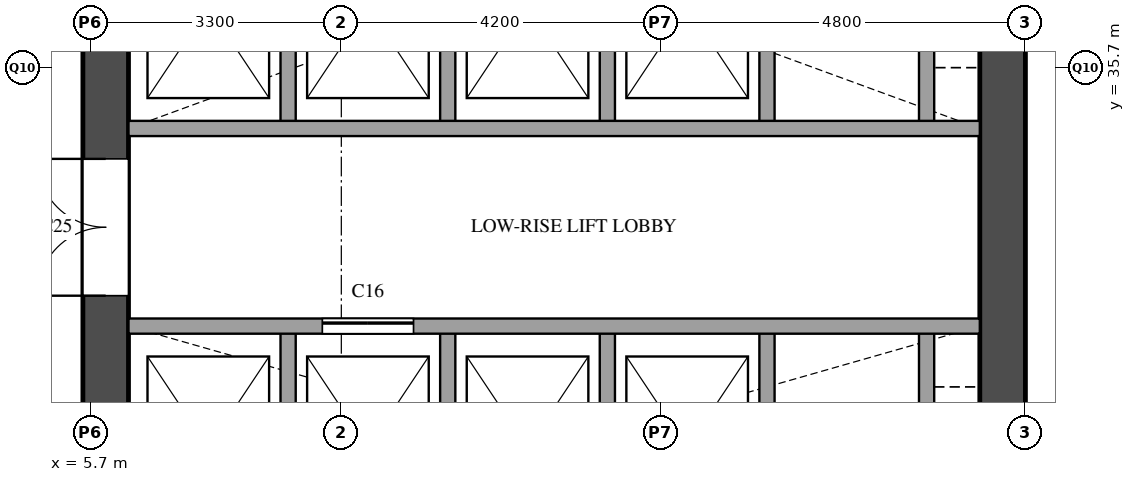
"""IFC4 building model, lengths in metres.
Left out: names, types, materials, properties, quantities, classifications, styles, units other than length and angle.
Written with IfcOpenShell. Run it as: python <this file> out.ifc"""

import sys

from ifc_helpers import new_model, si_unit, direction, frame, frame_2d, origin, place, context, subcontext, project, spatial, rectangle, extrude, element, fill, save


model = new_model("IFC4")
c1 = context("Model", 3, precision=1e-05, world=origin(), true_north=direction((0.0, 1.0)))
c2 = subcontext(c1, "Body", "Model", "MODEL_VIEW")
j1 = project(units=[si_unit("LENGTHUNIT", "METRE"), si_unit("PLANEANGLEUNIT", "RADIAN")], contexts=[c1])
p1 = place(None, origin())
s1 = spatial("IfcSite", under=j1, at=p1, CompositionType="ELEMENT")
p2 = place(p1, origin())
s2 = spatial("IfcBuilding", under=s1, at=p2, CompositionType="ELEMENT")
p3 = place(p2, frame((0.0, 0.0, 85.4)))
s3 = spatial("IfcBuildingStorey", under=s2, at=p3, CompositionType="ELEMENT", Elevation=85.4)
p4 = place(p3, frame((5.9, 29.1, 0.0), z_axis=(0.0, 0.0, 1.0), x_axis=(0.0, 1.0, 0.0)))
e1 = element("IfcWall", 1, at=p4, inside=s3, PredefinedType="SHEAR", context=c2, shape_type="SweptSolid", body=[
    extrude(rectangle(XDim=20.3, YDim=0.6, at=frame_2d((10.15, 0.0))), origin(), (0.0, 0.0, 1.0), 3.5),
])
p5 = place(p4, frame((3.6, 0.0, 0.0)))
e2 = element("IfcOpeningElement", 2, at=p5, cuts=e1, PredefinedType="OPENING", context=c2, shape_type="SweptSolid", body=[
    extrude(rectangle(XDim=1.8, YDim=2.1, at=frame_2d((0.9, 1.05))), frame((0.0, 0.31, 0.0), z_axis=(0.0, -1.0, 0.0), x_axis=(1.0, 0.0, 0.0)), (0.0, 0.0, 1.0), 0.62),
])
p6 = place(p4, frame((16.4, 0.0, 0.0)))
e3 = element("IfcOpeningElement", 3, at=p6, cuts=e1, PredefinedType="OPENING", context=c2, shape_type="SweptSolid", body=[
    extrude(rectangle(XDim=1.0, YDim=2.1, at=frame_2d((0.5, 1.05))), frame((0.0, 0.31, 0.0), z_axis=(0.0, -1.0, 0.0), x_axis=(1.0, 0.0, 0.0)), (0.0, 0.0, 1.0), 0.62),
])
p7 = place(p3, frame((17.7, 29.1, 0.0), z_axis=(0.0, 0.0, 1.0), x_axis=(0.0, 1.0, 0.0)))
e4 = element("IfcWall", 4, at=p7, inside=s3, PredefinedType="SHEAR", context=c2, shape_type="SweptSolid", body=[
    extrude(rectangle(XDim=20.3, YDim=0.6, at=frame_2d((10.15, 0.0))), origin(), (0.0, 0.0, 1.0), 3.5),
])
p8 = place(p7, frame((1.25, 0.0, 0.0)))
e5 = element("IfcOpeningElement", 5, at=p8, cuts=e4, PredefinedType="OPENING", context=c2, shape_type="SweptSolid", body=[
    extrude(rectangle(XDim=0.7, YDim=2.1, at=frame_2d((0.35, 1.05))), frame((0.0, 0.31, 0.0), z_axis=(0.0, -1.0, 0.0), x_axis=(1.0, 0.0, 0.0)), (0.0, 0.0, 1.0), 0.62),
])
p9 = place(p7, frame((7.05, 0.0, 0.0)))
e6 = element("IfcOpeningElement", 6, at=p9, cuts=e4, PredefinedType="OPENING", context=c2, shape_type="SweptSolid", body=[
    extrude(rectangle(XDim=0.7, YDim=2.1, at=frame_2d((0.35, 1.05))), frame((0.0, 0.31, 0.0), z_axis=(0.0, -1.0, 0.0), x_axis=(1.0, 0.0, 0.0)), (0.0, 0.0, 1.0), 0.62),
])
p10 = place(p3, frame((8.3, 29.1, 0.0), z_axis=(0.0, 0.0, 1.0), x_axis=(0.0, 1.0, 0.0)))
e7 = element("IfcWall", 7, at=p10, inside=s3, PredefinedType="SOLIDWALL", context=c2, shape_type="SweptSolid", body=[
    extrude(rectangle(XDim=3.2, YDim=0.2, at=frame_2d((1.6, 0.0))), origin(), (0.0, 0.0, 1.0), 3.5),
])
p11 = place(p3, frame((8.3, 34.9, 0.0), z_axis=(0.0, 0.0, 1.0), x_axis=(0.0, 1.0, 0.0)))
e8 = element("IfcWall", 8, at=p11, inside=s3, PredefinedType="SOLIDWALL", context=c2, shape_type="SweptSolid", body=[
    extrude(rectangle(XDim=3.2, YDim=0.2, at=frame_2d((1.6, 0.0))), origin(), (0.0, 0.0, 1.0), 3.5),
])
p12 = place(p3, frame((10.4, 29.1, 0.0), z_axis=(0.0, 0.0, 1.0), x_axis=(0.0, 1.0, 0.0)))
e9 = element("IfcWall", 9, at=p12, inside=s3, PredefinedType="SOLIDWALL", context=c2, shape_type="SweptSolid", body=[
    extrude(rectangle(XDim=3.2, YDim=0.2, at=frame_2d((1.6, 0.0))), origin(), (0.0, 0.0, 1.0), 3.5),
])
p13 = place(p3, frame((10.4, 34.9, 0.0), z_axis=(0.0, 0.0, 1.0), x_axis=(0.0, 1.0, 0.0)))
e10 = element("IfcWall", 10, at=p13, inside=s3, PredefinedType="SOLIDWALL", context=c2, shape_type="SweptSolid", body=[
    extrude(rectangle(XDim=3.2, YDim=0.2, at=frame_2d((1.6, 0.0))), origin(), (0.0, 0.0, 1.0), 3.5),
])
p14 = place(p3, frame((12.5, 29.1, 0.0), z_axis=(0.0, 0.0, 1.0), x_axis=(0.0, 1.0, 0.0)))
e11 = element("IfcWall", 11, at=p14, inside=s3, PredefinedType="SOLIDWALL", context=c2, shape_type="SweptSolid", body=[
    extrude(rectangle(XDim=3.2, YDim=0.2, at=frame_2d((1.6, 0.0))), origin(), (0.0, 0.0, 1.0), 3.5),
])
p15 = place(p3, frame((12.5, 34.9, 0.0), z_axis=(0.0, 0.0, 1.0), x_axis=(0.0, 1.0, 0.0)))
e12 = element("IfcWall", 12, at=p15, inside=s3, PredefinedType="SOLIDWALL", context=c2, shape_type="SweptSolid", body=[
    extrude(rectangle(XDim=3.2, YDim=0.2, at=frame_2d((1.6, 0.0))), origin(), (0.0, 0.0, 1.0), 3.5),
])
p16 = place(p3, frame((14.6, 29.1, 0.0), z_axis=(0.0, 0.0, 1.0), x_axis=(0.0, 1.0, 0.0)))
e13 = element("IfcWall", 13, at=p16, inside=s3, PredefinedType="SOLIDWALL", context=c2, shape_type="SweptSolid", body=[
    extrude(rectangle(XDim=3.2, YDim=0.2, at=frame_2d((1.6, 0.0))), origin(), (0.0, 0.0, 1.0), 3.5),
])
p17 = place(p3, frame((14.6, 34.9, 0.0), z_axis=(0.0, 0.0, 1.0), x_axis=(0.0, 1.0, 0.0)))
e14 = element("IfcWall", 14, at=p17, inside=s3, PredefinedType="SOLIDWALL", context=c2, shape_type="SweptSolid", body=[
    extrude(rectangle(XDim=3.2, YDim=0.2, at=frame_2d((1.6, 0.0))), origin(), (0.0, 0.0, 1.0), 3.5),
])
p18 = place(p3, frame((16.7, 29.1, 0.0), z_axis=(0.0, 0.0, 1.0), x_axis=(0.0, 1.0, 0.0)))
e15 = element("IfcWall", 15, at=p18, inside=s3, PredefinedType="SOLIDWALL", context=c2, shape_type="SweptSolid", body=[
    extrude(rectangle(XDim=3.2, YDim=0.2, at=frame_2d((1.6, 0.0))), origin(), (0.0, 0.0, 1.0), 3.5),
])
p19 = place(p3, frame((16.7, 34.9, 0.0), z_axis=(0.0, 0.0, 1.0), x_axis=(0.0, 1.0, 0.0)))
e16 = element("IfcWall", 16, at=p19, inside=s3, PredefinedType="SOLIDWALL", context=c2, shape_type="SweptSolid", body=[
    extrude(rectangle(XDim=3.2, YDim=0.2, at=frame_2d((1.6, 0.0))), origin(), (0.0, 0.0, 1.0), 3.5),
])
p20 = place(p3, frame((6.2, 32.3, 0.0), z_axis=(0.0, 0.0, 1.0), x_axis=(1.0, 0.0, 0.0)))
e17 = element("IfcWall", 17, at=p20, inside=s3, PredefinedType="SOLIDWALL", context=c2, shape_type="SweptSolid", body=[
    extrude(rectangle(XDim=11.2, YDim=0.2, at=frame_2d((5.6, 0.0))), origin(), (0.0, 0.0, 1.0), 3.5),
])
p21 = place(p20, frame((2.55, 0.0, 0.0)))
e18 = element("IfcOpeningElement", 18, at=p21, cuts=e17, PredefinedType="OPENING", context=c2, shape_type="SweptSolid", body=[
    extrude(rectangle(XDim=1.2, YDim=2.1, at=frame_2d((0.6, 1.05))), frame((0.0, 0.11, 0.0), z_axis=(0.0, -1.0, 0.0), x_axis=(1.0, 0.0, 0.0)), (0.0, 0.0, 1.0), 0.22),
])
p22 = place(p3, frame((6.2, 34.9, 0.0), z_axis=(0.0, 0.0, 1.0), x_axis=(1.0, 0.0, 0.0)))
e19 = element("IfcWall", 19, at=p22, inside=s3, PredefinedType="SOLIDWALL", context=c2, shape_type="SweptSolid", body=[
    extrude(rectangle(XDim=11.2, YDim=0.2, at=frame_2d((5.6, 0.0))), origin(), (0.0, 0.0, 1.0), 3.5),
])
p23 = place(p21, origin())
e20 = element("IfcDoor", 20, at=p23, inside=s3, OperationType="SLIDING_TO_LEFT", PredefinedType="DOOR", context=c2, shape_type="SweptSolid", body=[
    extrude(rectangle(XDim=1.2, YDim=2.1, at=frame_2d((0.6, 1.05))), frame((0.0, 0.025, 0.0), z_axis=(0.0, -1.0, 0.0), x_axis=(1.0, 0.0, 0.0)), (0.0, 0.0, 1.0), 0.05),
])
fill(e18, e20)
p24 = place(p5, origin())
e21 = element("IfcDoor", 21, at=p24, inside=s3, OperationType="DOUBLE_DOOR_SINGLE_SWING", PredefinedType="DOOR", context=c2, shape_type="SweptSolid", body=[
    extrude(rectangle(XDim=1.8, YDim=2.1, at=frame_2d((0.9, 1.05))), frame((0.0, 0.025, 0.0), z_axis=(0.0, -1.0, 0.0), x_axis=(1.0, 0.0, 0.0)), (0.0, 0.0, 1.0), 0.05),
])
fill(e2, e21)
save(model, sys.argv[1])
